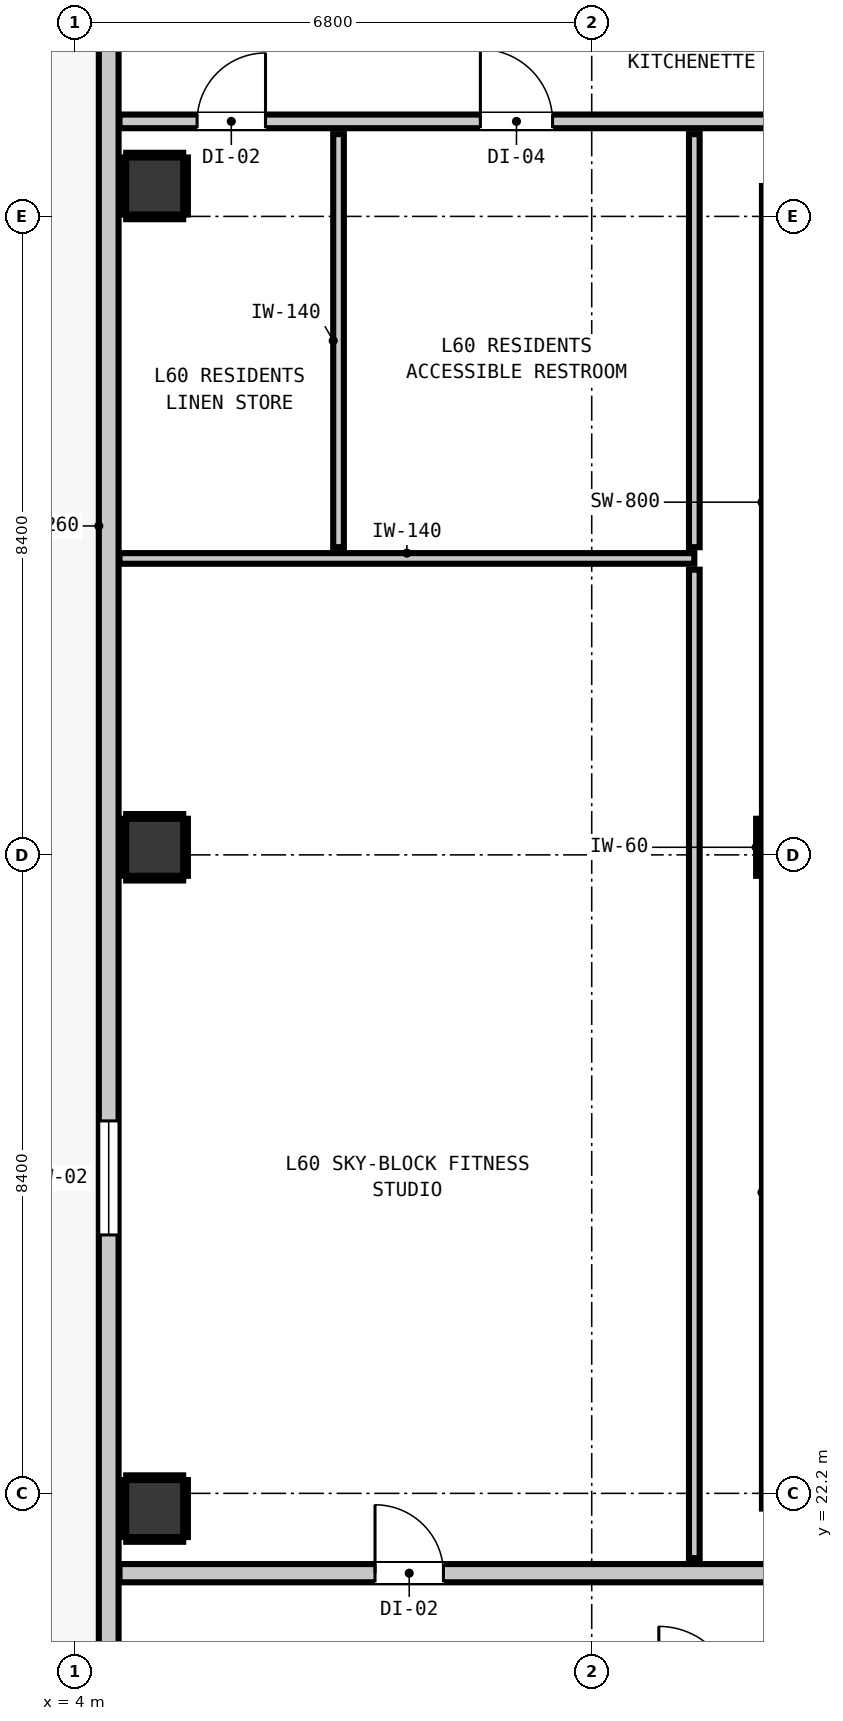
"""IFC4 building model, lengths in metres.
Left out: names, types, materials, properties, quantities, classifications, styles, units other than length and angle.
Written with IfcOpenShell. Run it as: python <this file> out.ifc"""

import sys

from ifc_helpers import new_model, si_unit, direction, frame, frame_2d, origin, origin_2d, place, context, subcontext, project, spatial, rectangle, extrude, element, fill, save


model = new_model("IFC4")
c1 = context("Model", 3, precision=1e-05, world=origin(), true_north=direction((0.0, 1.0)))
c2 = subcontext(c1, "Body", "Model", "MODEL_VIEW")
j1 = project(units=[si_unit("LENGTHUNIT", "METRE"), si_unit("PLANEANGLEUNIT", "RADIAN")], contexts=[c1])
p1 = place(None, origin())
s1 = spatial("IfcSite", under=j1, at=p1, CompositionType="ELEMENT")
p2 = place(p1, origin())
s2 = spatial("IfcBuilding", under=s1, at=p2, CompositionType="ELEMENT")
p3 = place(p2, frame((0.0, 0.0, 206.76)))
s3 = spatial("IfcBuildingStorey", under=s2, at=p3, CompositionType="ELEMENT", Elevation=206.76)
p4 = place(p3, frame((13.4, 30.7, 0.0), z_axis=(0.0, 0.0, 1.0), x_axis=(1.0, 0.0, 0.0)))
e1 = element("IfcColumn", 1, at=p4, inside=s3, PredefinedType="COLUMN", context=c2, shape_type="SweptSolid", body=[
    extrude(rectangle(XDim=0.75, YDim=0.75, at=origin_2d()), origin(), (0.0, 0.0, 1.0), 3.32),
])
p5 = place(p3, frame((13.44, 22.0, 0.0), z_axis=(0.0, 0.0, 1.0), x_axis=(0.0, 1.0, 0.0)))
e2 = element("IfcWall", 2, at=p5, inside=s3, PredefinedType="SHEAR", context=c2, shape_type="SweptSolid", body=[
    extrude(rectangle(XDim=8.32, YDim=0.8, at=frame_2d((4.16, 0.0))), origin(), (0.0, 0.0, 1.0), 3.32),
])
p6 = place(p3, frame((13.44, 31.08, 0.0), z_axis=(0.0, 0.0, 1.0), x_axis=(0.0, 1.0, 0.0)))
e3 = element("IfcWall", 3, at=p6, inside=s3, PredefinedType="SHEAR", context=c2, shape_type="SweptSolid", body=[
    extrude(rectangle(XDim=8.32, YDim=0.8, at=frame_2d((4.16, 0.0))), origin(), (0.0, 0.0, 1.0), 3.32),
])
for number, where, z_axis, x_axis in (
    (4, (5.05, 22.0, 0.0), (0.0, 0.0, 1.0), (1.0, 0.0, 0.0)),
    (5, (5.05, 30.7, 0.0), (0.0, 0.0, 1.0), (1.0, 0.0, 0.0)),
    (6, (5.05, 39.4, 0.0), (0.0, 0.0, 1.0), (1.0, 0.0, 0.0)),
):
    element("IfcColumn", number, at=place(p3, frame(where, z_axis=z_axis, x_axis=x_axis)), inside=s3, PredefinedType="COLUMN", context=c2, shape_type="SweptSolid", body=[
        extrude(rectangle(XDim=0.75, YDim=0.75, at=origin_2d()), origin(), (0.0, 0.0, 1.0), 2.9),
    ])
p7 = place(p3, frame((4.445, 12.345, 0.0), z_axis=(0.0, 0.0, 1.0), x_axis=(0.0, 1.0, 0.0)))
e7 = element("IfcWall", 7, at=p7, inside=s3, PredefinedType="STANDARD", context=c2, shape_type="SweptSolid", body=[
    extrude(rectangle(XDim=30.31, YDim=0.26, at=frame_2d((15.155, 0.0))), origin(), (0.0, 0.0, 1.0), 2.9),
])
p8 = place(p7, frame((0.91, 0.0, 0.0)))
e8 = element("IfcOpeningElement", 8, at=p8, cuts=e7, PredefinedType="OPENING", context=c2, shape_type="SweptSolid", body=[
    extrude(rectangle(XDim=1.0, YDim=2.15, at=frame_2d((0.5, 1.075))), frame((0.0, 0.14, 0.0), z_axis=(0.0, -1.0, 0.0), x_axis=(1.0, 0.0, 0.0)), (0.0, 0.0, 1.0), 0.28),
])
p9 = place(p7, frame((2.322, 0.0, 0.85)))
e9 = element("IfcOpeningElement", 9, at=p9, cuts=e7, PredefinedType="OPENING", context=c2, shape_type="SweptSolid", body=[
    extrude(rectangle(XDim=0.58, YDim=1.5, at=frame_2d((0.29, 0.75))), frame((0.0, 0.14, 0.0), z_axis=(0.0, -1.0, 0.0), x_axis=(1.0, 0.0, 0.0)), (0.0, 0.0, 1.0), 0.28),
])
p10 = place(p7, frame((13.255, 0.0, 0.85)))
e10 = element("IfcOpeningElement", 10, at=p10, cuts=e7, PredefinedType="OPENING", context=c2, shape_type="SweptSolid", body=[
    extrude(rectangle(XDim=1.5, YDim=1.8, at=frame_2d((0.75, 0.9))), frame((0.0, 0.14, 0.0), z_axis=(0.0, -1.0, 0.0), x_axis=(1.0, 0.0, 0.0)), (0.0, 0.0, 1.0), 0.28),
])
p11 = place(p3, frame((4.587, 21.15, 0.0), z_axis=(0.0, 0.0, 1.0), x_axis=(1.0, 0.0, 0.0)))
e11 = element("IfcWall", 11, at=p11, inside=s3, PredefinedType="PARTITIONING", context=c2, shape_type="SweptSolid", body=[
    extrude(rectangle(XDim=36.626, YDim=0.24, at=frame_2d((18.313, 0.0))), origin(), (0.0, 0.0, 1.0), 2.9),
])
p12 = place(p11, frame((13.623, 0.0, 0.0)))
e12 = element("IfcOpeningElement", 12, at=p12, cuts=e11, PredefinedType="OPENING", context=c2, shape_type="SweptSolid", body=[
    extrude(rectangle(XDim=1.1, YDim=2.15, at=frame_2d((0.55, 1.075))), frame((0.0, 0.13, 0.0), z_axis=(0.0, -1.0, 0.0), x_axis=(1.0, 0.0, 0.0)), (0.0, 0.0, 1.0), 0.26),
])
p13 = place(p11, frame((3.362, 0.0, 0.0)))
e13 = element("IfcOpeningElement", 13, at=p13, cuts=e11, PredefinedType="OPENING", context=c2, shape_type="SweptSolid", body=[
    extrude(rectangle(XDim=0.9, YDim=2.1, at=frame_2d((0.45, 1.05))), frame((0.0, 0.13, 0.0), z_axis=(0.0, -1.0, 0.0), x_axis=(1.0, 0.0, 0.0)), (0.0, 0.0, 1.0), 0.26),
])
p14 = place(p3, frame((4.587, 40.25, 0.0), z_axis=(0.0, 0.0, 1.0), x_axis=(1.0, 0.0, 0.0)))
e14 = element("IfcWall", 14, at=p14, inside=s3, PredefinedType="PARTITIONING", context=c2, shape_type="SweptSolid", body=[
    extrude(rectangle(XDim=36.626, YDim=0.18, at=frame_2d((18.313, 0.0))), origin(), (0.0, 0.0, 1.0), 2.9),
])
p15 = place(p14, frame((12.848, 0.0, 0.0)))
e15 = element("IfcOpeningElement", 15, at=p15, cuts=e14, PredefinedType="OPENING", context=c2, shape_type="SweptSolid", body=[
    extrude(rectangle(XDim=1.4, YDim=2.15, at=frame_2d((0.7, 1.075))), frame((0.0, 0.1, 0.0), z_axis=(0.0, -1.0, 0.0), x_axis=(1.0, 0.0, 0.0)), (0.0, 0.0, 1.0), 0.2),
])
p16 = place(p14, frame((1.021, 0.0, 0.0)))
e16 = element("IfcOpeningElement", 16, at=p16, cuts=e14, PredefinedType="OPENING", context=c2, shape_type="SweptSolid", body=[
    extrude(rectangle(XDim=0.9, YDim=2.1, at=frame_2d((0.45, 1.05))), frame((0.0, 0.1, 0.0), z_axis=(0.0, -1.0, 0.0), x_axis=(1.0, 0.0, 0.0)), (0.0, 0.0, 1.0), 0.2),
])
p17 = place(p14, frame((4.748, 0.0, 0.0)))
e17 = element("IfcOpeningElement", 17, at=p17, cuts=e14, PredefinedType="OPENING", context=c2, shape_type="SweptSolid", body=[
    extrude(rectangle(XDim=0.95, YDim=2.1, at=frame_2d((0.475, 1.05))), frame((0.0, 0.1, 0.0), z_axis=(0.0, -1.0, 0.0), x_axis=(1.0, 0.0, 0.0)), (0.0, 0.0, 1.0), 0.2),
])
p18 = place(p3, frame((4.587, 34.5, 0.0), z_axis=(0.0, 0.0, 1.0), x_axis=(1.0, 0.0, 0.0)))
e18 = element("IfcWall", 18, at=p18, inside=s3, PredefinedType="PARTITIONING", context=c2, shape_type="SweptSolid", body=[
    extrude(rectangle(XDim=7.563, YDim=0.14, at=frame_2d((3.781, 0.0))), origin(), (0.0, 0.0, 1.0), 2.9),
])
p19 = place(p3, frame((7.469, 34.648, 0.0), z_axis=(0.0, 0.0, 1.0), x_axis=(0.0, 1.0, 0.0)))
e19 = element("IfcWall", 19, at=p19, inside=s3, PredefinedType="PARTITIONING", context=c2, shape_type="SweptSolid", body=[
    extrude(rectangle(XDim=5.434, YDim=0.14, at=frame_2d((2.717, 0.0))), origin(), (0.0, 0.0, 1.0), 2.9),
])
p20 = place(p3, frame((12.15, 21.348, 0.0), z_axis=(0.0, 0.0, 1.0), x_axis=(0.0, 1.0, 0.0)))
e20 = element("IfcWall", 20, at=p20, inside=s3, PredefinedType="PARTITIONING", context=c2, shape_type="SweptSolid", body=[
    extrude(rectangle(XDim=13.004, YDim=0.14, at=frame_2d((6.502, 0.0))), origin(), (0.0, 0.0, 1.0), 2.9),
])
p21 = place(p3, frame((12.15, 34.648, 0.0), z_axis=(0.0, 0.0, 1.0), x_axis=(0.0, 1.0, 0.0)))
e21 = element("IfcWall", 21, at=p21, inside=s3, PredefinedType="PARTITIONING", context=c2, shape_type="SweptSolid", body=[
    extrude(rectangle(XDim=5.434, YDim=0.14, at=frame_2d((2.717, 0.0))), origin(), (0.0, 0.0, 1.0), 2.9),
])
for number, where, z_axis, x_axis in (
    (22, (12.993, 30.325, 0.0), (0.0, 0.0, 1.0), (0.0, 1.0, 0.0)),
    (23, (4.675, 21.593, 0.0), (0.0, 0.0, 1.0), (1.0, 0.0, 0.0)),
    (24, (4.675, 22.407, 0.0), (0.0, 0.0, 1.0), (1.0, 0.0, 0.0)),
):
    element("IfcWall", number, at=place(p3, frame(where, z_axis=z_axis, x_axis=x_axis)), inside=s3, PredefinedType="PARTITIONING", context=c2, shape_type="SweptSolid", body=[
        extrude(rectangle(XDim=0.75, YDim=0.06, at=frame_2d((0.375, 0.0))), origin(), (0.0, 0.0, 1.0), 0.905),
    ])
for number, where, z_axis, x_axis in (
    (25, (4.643, 21.625, 0.0), (0.0, 0.0, 1.0), (0.0, 1.0, 0.0)),
    (26, (5.457, 21.625, 0.0), (0.0, 0.0, 1.0), (0.0, 1.0, 0.0)),
):
    element("IfcWall", number, at=place(p3, frame(where, z_axis=z_axis, x_axis=x_axis)), inside=s3, PredefinedType="PARTITIONING", context=c2, shape_type="SweptSolid", body=[
        extrude(rectangle(XDim=0.75, YDim=0.06, at=frame_2d((0.375, 0.0))), origin(), (0.0, 0.0, 1.0), 1.45),
    ])
for number, where, z_axis, x_axis in (
    (27, (4.675, 30.293, 0.0), (0.0, 0.0, 1.0), (1.0, 0.0, 0.0)),
    (28, (4.675, 31.107, 0.0), (0.0, 0.0, 1.0), (1.0, 0.0, 0.0)),
):
    element("IfcWall", number, at=place(p3, frame(where, z_axis=z_axis, x_axis=x_axis)), inside=s3, PredefinedType="PARTITIONING", context=c2, shape_type="SweptSolid", body=[
        extrude(rectangle(XDim=0.75, YDim=0.06, at=frame_2d((0.375, 0.0))), origin(), (0.0, 0.0, 1.0), 0.905),
    ])
for number, where, z_axis, x_axis in (
    (29, (4.643, 30.325, 0.0), (0.0, 0.0, 1.0), (0.0, 1.0, 0.0)),
    (30, (5.457, 30.325, 0.0), (0.0, 0.0, 1.0), (0.0, 1.0, 0.0)),
):
    element("IfcWall", number, at=place(p3, frame(where, z_axis=z_axis, x_axis=x_axis)), inside=s3, PredefinedType="PARTITIONING", context=c2, shape_type="SweptSolid", body=[
        extrude(rectangle(XDim=0.75, YDim=0.06, at=frame_2d((0.375, 0.0))), origin(), (0.0, 0.0, 1.0), 1.45),
    ])
for number, where, z_axis, x_axis in (
    (31, (4.675, 38.993, 0.0), (0.0, 0.0, 1.0), (1.0, 0.0, 0.0)),
    (32, (4.675, 39.807, 0.0), (0.0, 0.0, 1.0), (1.0, 0.0, 0.0)),
):
    element("IfcWall", number, at=place(p3, frame(where, z_axis=z_axis, x_axis=x_axis)), inside=s3, PredefinedType="PARTITIONING", context=c2, shape_type="SweptSolid", body=[
        extrude(rectangle(XDim=0.75, YDim=0.06, at=frame_2d((0.375, 0.0))), origin(), (0.0, 0.0, 1.0), 0.905),
    ])
for number, where, z_axis, x_axis in (
    (33, (4.643, 39.025, 0.0), (0.0, 0.0, 1.0), (0.0, 1.0, 0.0)),
    (34, (5.457, 39.025, 0.0), (0.0, 0.0, 1.0), (0.0, 1.0, 0.0)),
):
    element("IfcWall", number, at=place(p3, frame(where, z_axis=z_axis, x_axis=x_axis)), inside=s3, PredefinedType="PARTITIONING", context=c2, shape_type="SweptSolid", body=[
        extrude(rectangle(XDim=0.75, YDim=0.06, at=frame_2d((0.375, 0.0))), origin(), (0.0, 0.0, 1.0), 1.45),
    ])
p22 = place(p10, origin())
e35 = element("IfcWindow", 35, at=p22, inside=s3, PartitioningType="SINGLE_PANEL", PredefinedType="WINDOW", context=c2, shape_type="SweptSolid", body=[
    extrude(rectangle(XDim=1.5, YDim=1.8, at=frame_2d((0.75, 0.9))), frame((0.0, 0.03, 0.0), z_axis=(0.0, -1.0, 0.0), x_axis=(1.0, 0.0, 0.0)), (0.0, 0.0, 1.0), 0.06),
])
fill(e10, e35)
p23 = place(p13, origin())
e36 = element("IfcDoor", 36, at=p23, inside=s3, OperationType="SINGLE_SWING_LEFT", PredefinedType="DOOR", context=c2, shape_type="SweptSolid", body=[
    extrude(rectangle(XDim=0.9, YDim=2.1, at=frame_2d((0.45, 1.05))), frame((0.0, 0.025, 0.0), z_axis=(0.0, -1.0, 0.0), x_axis=(1.0, 0.0, 0.0)), (0.0, 0.0, 1.0), 0.05),
])
fill(e13, e36)
p24 = place(p16, origin())
e37 = element("IfcDoor", 37, at=p24, inside=s3, OperationType="SINGLE_SWING_RIGHT", PredefinedType="DOOR", context=c2, shape_type="SweptSolid", body=[
    extrude(rectangle(XDim=0.9, YDim=2.1, at=frame_2d((0.45, 1.05))), frame((0.0, 0.025, 0.0), z_axis=(0.0, -1.0, 0.0), x_axis=(1.0, 0.0, 0.0)), (0.0, 0.0, 1.0), 0.05),
])
fill(e16, e37)
p25 = place(p17, origin())
e38 = element("IfcDoor", 38, at=p25, inside=s3, OperationType="SINGLE_SWING_LEFT", PredefinedType="DOOR", context=c2, shape_type="SweptSolid", body=[
    extrude(rectangle(XDim=0.95, YDim=2.1, at=frame_2d((0.475, 1.05))), frame((0.0, 0.025, 0.0), z_axis=(0.0, -1.0, 0.0), x_axis=(1.0, 0.0, 0.0)), (0.0, 0.0, 1.0), 0.05),
])
fill(e17, e38)
save(model, sys.argv[1])
